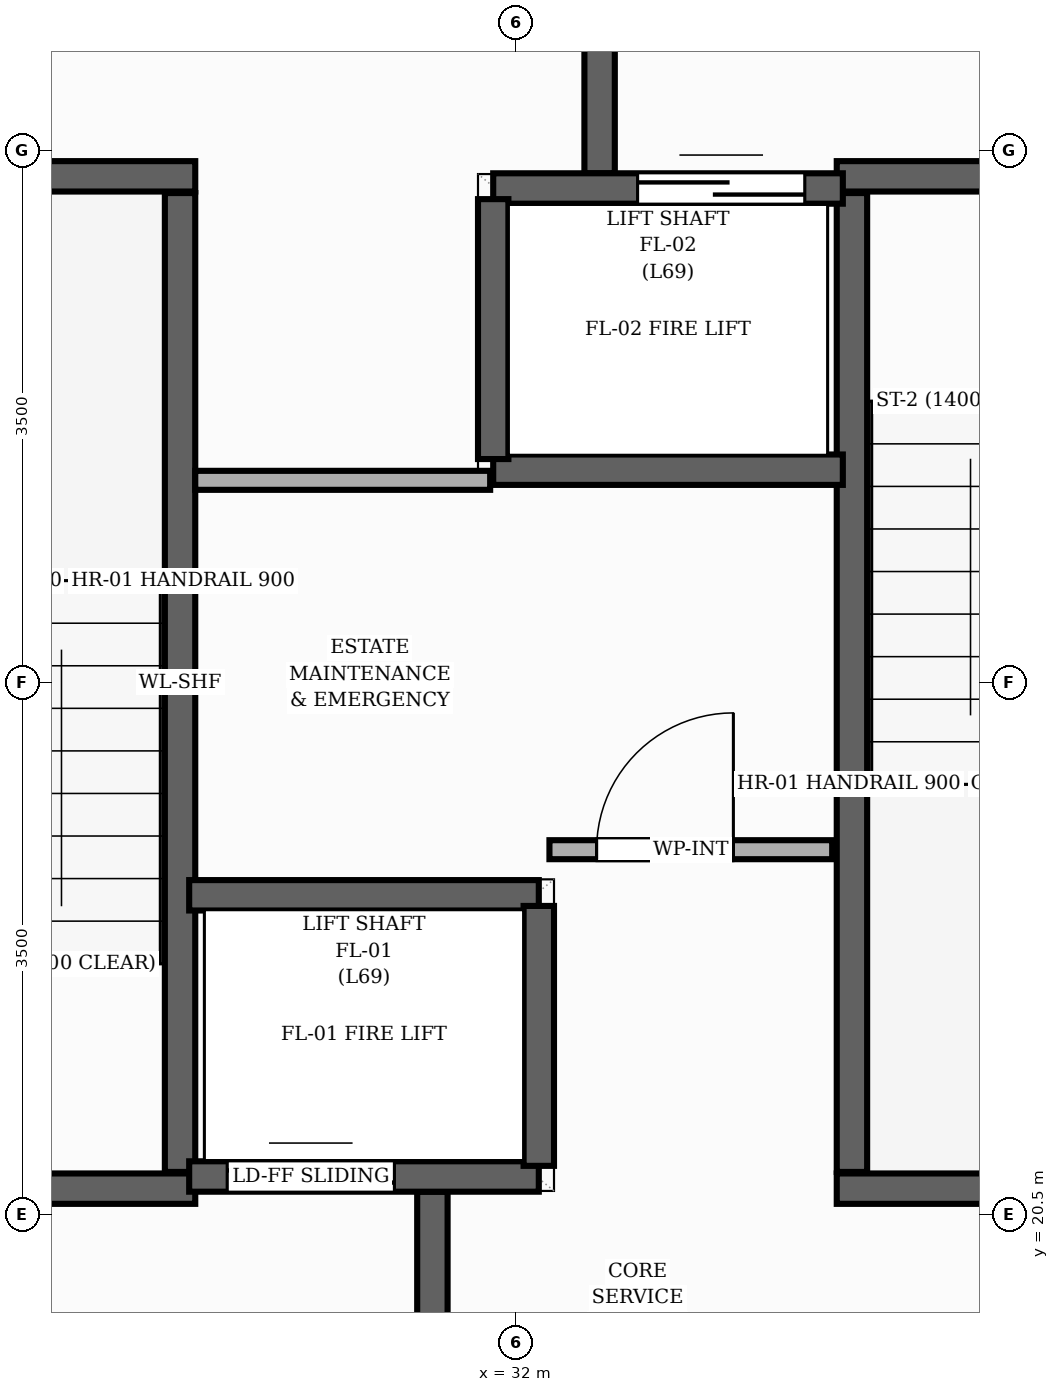
"""IFC4 building model, lengths in metres.
Left out: names, types, materials, properties, quantities, classifications, styles, units other than length and angle.
Written with IfcOpenShell. Run it as: python <this file> out.ifc"""

import sys

from ifc_helpers import new_model, si_unit, direction, frame, frame_2d, origin, place, context, subcontext, project, spatial, rectangle, extrude, element, fill, save


model = new_model("IFC4")
c1 = context("Model", 3, precision=1e-05, world=origin(), true_north=direction((0.0, 1.0)))
c2 = subcontext(c1, "Body", "Model", "MODEL_VIEW")
j1 = project(units=[si_unit("LENGTHUNIT", "METRE"), si_unit("PLANEANGLEUNIT", "RADIAN")], contexts=[c1])
p1 = place(None, origin())
s1 = spatial("IfcSite", under=j1, at=p1, CompositionType="ELEMENT")
p2 = place(p1, origin())
s2 = spatial("IfcBuilding", under=s1, at=p2, CompositionType="ELEMENT")
p3 = place(p2, frame((0.0, 0.0, 230.24)))
s3 = spatial("IfcBuildingStorey", under=s2, at=p3, CompositionType="ELEMENT", Elevation=230.24)
p4 = place(p3, frame((29.79, 20.78, 0.0), z_axis=(0.0, 0.0, 1.0), x_axis=(0.0, 1.0, 0.0)))
e1 = element("IfcWall", 1, at=p4, inside=s3, PredefinedType="SHEAR", context=c2, shape_type="SweptSolid", body=[
    extrude(rectangle(XDim=6.44, YDim=0.2, at=frame_2d((3.22, 0.0))), origin(), (0.0, 0.0, 1.0), 3.2),
])
p5 = place(p3, frame((26.65, 27.33, 0.0), z_axis=(0.0, 0.0, 1.0), x_axis=(1.0, 0.0, 0.0)))
e2 = element("IfcWall", 2, at=p5, inside=s3, PredefinedType="SHEAR", context=c2, shape_type="SweptSolid", body=[
    extrude(rectangle(XDim=3.24, YDim=0.2, at=frame_2d((1.62, 0.0))), origin(), (0.0, 0.0, 1.0), 3.2),
])
p6 = place(p3, frame((26.65, 20.67, 0.0), z_axis=(0.0, 0.0, 1.0), x_axis=(1.0, 0.0, 0.0)))
e3 = element("IfcWall", 3, at=p6, inside=s3, PredefinedType="SHEAR", context=c2, shape_type="SweptSolid", body=[
    extrude(rectangle(XDim=3.24, YDim=0.2, at=frame_2d((1.62, 0.0))), origin(), (0.0, 0.0, 1.0), 3.2),
])
p7 = place(p6, frame((1.055, 0.0, 0.0)))
e4 = element("IfcOpeningElement", 4, at=p7, cuts=e3, PredefinedType="OPENING", context=c2, shape_type="SweptSolid", body=[
    extrude(rectangle(XDim=1.05, YDim=2.15, at=frame_2d((0.525, 1.075))), frame((0.0, 0.11, 0.0), z_axis=(0.0, -1.0, 0.0), x_axis=(1.0, 0.0, 0.0)), (0.0, 0.0, 1.0), 0.22),
])
p8 = place(p3, frame((34.21, 20.78, 0.0), z_axis=(0.0, 0.0, 1.0), x_axis=(0.0, 1.0, 0.0)))
e5 = element("IfcWall", 5, at=p8, inside=s3, PredefinedType="SHEAR", context=c2, shape_type="SweptSolid", body=[
    extrude(rectangle(XDim=6.44, YDim=0.2, at=frame_2d((3.22, 0.0))), origin(), (0.0, 0.0, 1.0), 3.2),
])
p9 = place(p3, frame((34.11, 20.67, 0.0), z_axis=(0.0, 0.0, 1.0), x_axis=(1.0, 0.0, 0.0)))
e6 = element("IfcWall", 6, at=p9, inside=s3, PredefinedType="SHEAR", context=c2, shape_type="SweptSolid", body=[
    extrude(rectangle(XDim=3.24, YDim=0.2, at=frame_2d((1.62, 0.0))), origin(), (0.0, 0.0, 1.0), 3.2),
])
p10 = place(p3, frame((34.11, 27.33, 0.0), z_axis=(0.0, 0.0, 1.0), x_axis=(1.0, 0.0, 0.0)))
e7 = element("IfcWall", 7, at=p10, inside=s3, PredefinedType="SHEAR", context=c2, shape_type="SweptSolid", body=[
    extrude(rectangle(XDim=3.24, YDim=0.2, at=frame_2d((1.62, 0.0))), origin(), (0.0, 0.0, 1.0), 3.2),
])
p11 = place(p10, frame((1.135, 0.0, 0.0)))
e8 = element("IfcOpeningElement", 8, at=p11, cuts=e7, PredefinedType="OPENING", context=c2, shape_type="SweptSolid", body=[
    extrude(rectangle(XDim=1.05, YDim=2.15, at=frame_2d((0.525, 1.075))), frame((0.0, 0.11, 0.0), z_axis=(0.0, -1.0, 0.0), x_axis=(1.0, 0.0, 0.0)), (0.0, 0.0, 1.0), 0.22),
])
for number, where, z_axis, x_axis in (
    (9, (31.45, 17.15, 0.0), (0.0, 0.0, 1.0), (0.0, 1.0, 0.0)),
    (10, (32.55, 27.35, 0.0), (0.0, 0.0, 1.0), (0.0, 1.0, 0.0)),
):
    element("IfcWall", number, at=place(p3, frame(where, z_axis=z_axis, x_axis=x_axis)), inside=s3, PredefinedType="SHEAR", context=c2, shape_type="SweptSolid", body=[
        extrude(rectangle(XDim=3.5, YDim=0.2, at=frame_2d((1.75, 0.0))), origin(), (0.0, 0.0, 1.0), 3.2),
    ])
p12 = place(p3, frame((29.85, 20.75, 0.0), z_axis=(0.0, 0.0, 1.0), x_axis=(1.0, 0.0, 0.0)))
e11 = element("IfcWall", 11, at=p12, inside=s3, PredefinedType="SHEAR", context=c2, shape_type="SweptSolid", body=[
    extrude(rectangle(XDim=2.3, YDim=0.2, at=frame_2d((1.15, 0.0))), origin(), (0.0, 0.0, 1.0), 3.2),
])
p13 = place(p12, frame((0.25, 0.0, 0.0)))
e12 = element("IfcOpeningElement", 12, at=p13, cuts=e11, PredefinedType="OPENING", context=c2, shape_type="SweptSolid", body=[
    extrude(rectangle(XDim=1.1, YDim=2.15, at=frame_2d((0.55, 1.075))), frame((0.0, 0.11, 0.0), z_axis=(0.0, -1.0, 0.0), x_axis=(1.0, 0.0, 0.0)), (0.0, 0.0, 1.0), 0.22),
])
p14 = place(p3, frame((29.85, 22.6, 0.0), z_axis=(0.0, 0.0, 1.0), x_axis=(1.0, 0.0, 0.0)))
e13 = element("IfcWall", 13, at=p14, inside=s3, PredefinedType="SHEAR", context=c2, shape_type="SweptSolid", body=[
    extrude(rectangle(XDim=2.3, YDim=0.2, at=frame_2d((1.15, 0.0))), origin(), (0.0, 0.0, 1.0), 3.2),
])
p15 = place(p3, frame((32.15, 20.82, 0.0), z_axis=(0.0, 0.0, 1.0), x_axis=(0.0, 1.0, 0.0)))
e14 = element("IfcWall", 14, at=p15, inside=s3, PredefinedType="SHEAR", context=c2, shape_type="SweptSolid", body=[
    extrude(rectangle(XDim=1.71, YDim=0.2, at=frame_2d((0.855, 0.0))), origin(), (0.0, 0.0, 1.0), 3.2),
])
p16 = place(p3, frame((31.85, 27.25, 0.0), z_axis=(0.0, 0.0, 1.0), x_axis=(1.0, 0.0, 0.0)))
e15 = element("IfcWall", 15, at=p16, inside=s3, PredefinedType="SHEAR", context=c2, shape_type="SweptSolid", body=[
    extrude(rectangle(XDim=2.3, YDim=0.2, at=frame_2d((1.15, 0.0))), origin(), (0.0, 0.0, 1.0), 3.2),
])
p17 = place(p16, frame((0.95, 0.0, 0.0)))
e16 = element("IfcOpeningElement", 16, at=p17, cuts=e15, PredefinedType="OPENING", context=c2, shape_type="SweptSolid", body=[
    extrude(rectangle(XDim=1.1, YDim=2.15, at=frame_2d((0.55, 1.075))), frame((0.0, 0.11, 0.0), z_axis=(0.0, -1.0, 0.0), x_axis=(1.0, 0.0, 0.0)), (0.0, 0.0, 1.0), 0.22),
])
p18 = place(p3, frame((31.85, 25.4, 0.0), z_axis=(0.0, 0.0, 1.0), x_axis=(1.0, 0.0, 0.0)))
e17 = element("IfcWall", 17, at=p18, inside=s3, PredefinedType="SHEAR", context=c2, shape_type="SweptSolid", body=[
    extrude(rectangle(XDim=2.3, YDim=0.2, at=frame_2d((1.15, 0.0))), origin(), (0.0, 0.0, 1.0), 3.2),
])
p19 = place(p3, frame((31.85, 25.47, 0.0), z_axis=(0.0, 0.0, 1.0), x_axis=(0.0, 1.0, 0.0)))
e18 = element("IfcWall", 18, at=p19, inside=s3, PredefinedType="SHEAR", context=c2, shape_type="SweptSolid", body=[
    extrude(rectangle(XDim=1.71, YDim=0.2, at=frame_2d((0.855, 0.0))), origin(), (0.0, 0.0, 1.0), 3.2),
])
p20 = place(p3, frame((32.22, 22.9, 0.0), z_axis=(0.0, 0.0, 1.0), x_axis=(1.0, 0.0, 0.0)))
e19 = element("IfcWall", 19, at=p20, inside=s3, PredefinedType="PARTITIONING", context=c2, shape_type="SweptSolid", body=[
    extrude(rectangle(XDim=1.86, YDim=0.125, at=frame_2d((0.93, 0.0))), origin(), (0.0, 0.0, 1.0), 2.955),
])
p21 = place(p20, frame((0.31, 0.0, 0.0)))
e20 = element("IfcOpeningElement", 20, at=p21, cuts=e19, PredefinedType="OPENING", context=c2, shape_type="SweptSolid", body=[
    extrude(rectangle(XDim=0.9, YDim=2.1, at=frame_2d((0.45, 1.05))), frame((0.0, 0.073, 0.0), z_axis=(0.0, -1.0, 0.0), x_axis=(1.0, 0.0, 0.0)), (0.0, 0.0, 1.0), 0.145),
])
p22 = place(p3, frame((29.89, 25.33, 0.0), z_axis=(0.0, 0.0, 1.0), x_axis=(1.0, 0.0, 0.0)))
e21 = element("IfcWall", 21, at=p22, inside=s3, PredefinedType="PARTITIONING", context=c2, shape_type="SweptSolid", body=[
    extrude(rectangle(XDim=1.94, YDim=0.125, at=frame_2d((0.97, 0.0))), origin(), (0.0, 0.0, 1.0), 2.955),
])
p23 = place(p13, origin())
e22 = element("IfcDoor", 22, at=p23, inside=s3, OperationType="DOUBLE_DOOR_SLIDING", PredefinedType="DOOR", context=c2, shape_type="SweptSolid", body=[
    extrude(rectangle(XDim=1.1, YDim=2.15, at=frame_2d((0.55, 1.075))), frame((0.0, 0.025, 0.0), z_axis=(0.0, -1.0, 0.0), x_axis=(1.0, 0.0, 0.0)), (0.0, 0.0, 1.0), 0.05),
])
fill(e12, e22)
p24 = place(p17, origin())
e23 = element("IfcDoor", 23, at=p24, inside=s3, OperationType="DOUBLE_DOOR_SLIDING", PredefinedType="DOOR", context=c2, shape_type="SweptSolid", body=[
    extrude(rectangle(XDim=1.1, YDim=2.15, at=frame_2d((0.55, 1.075))), frame((0.0, 0.025, 0.0), z_axis=(0.0, -1.0, 0.0), x_axis=(1.0, 0.0, 0.0)), (0.0, 0.0, 1.0), 0.05),
])
fill(e16, e23)
p25 = place(p21, origin())
e24 = element("IfcDoor", 24, at=p25, inside=s3, OperationType="SINGLE_SWING_RIGHT", PredefinedType="DOOR", context=c2, shape_type="SweptSolid", body=[
    extrude(rectangle(XDim=0.9, YDim=2.1, at=frame_2d((0.45, 1.05))), frame((0.0, 0.025, 0.0), z_axis=(0.0, -1.0, 0.0), x_axis=(1.0, 0.0, 0.0)), (0.0, 0.0, 1.0), 0.05),
])
fill(e20, e24)
save(model, sys.argv[1])
